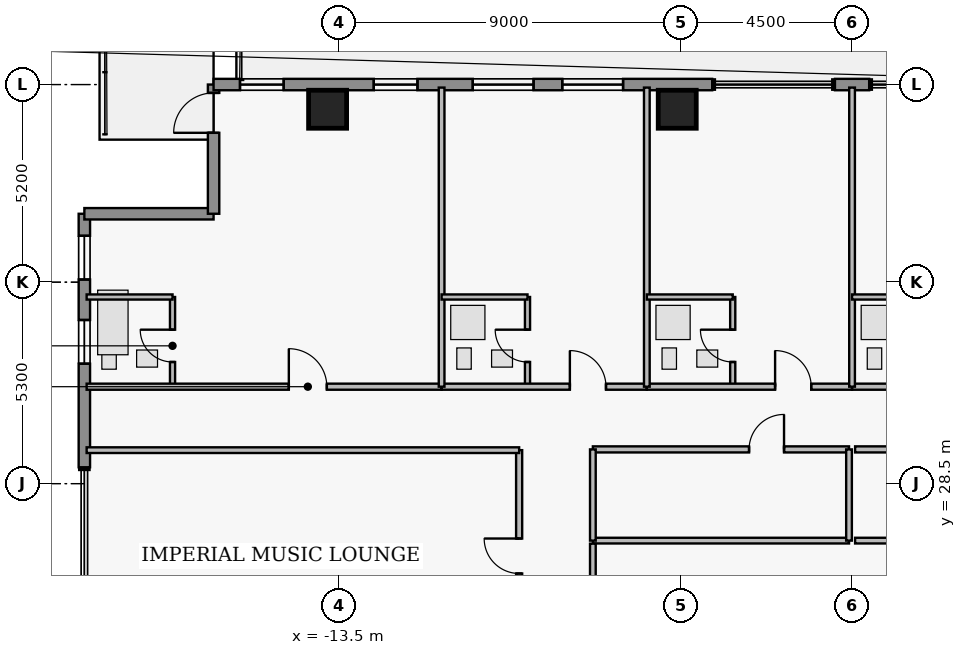
"""IFC4 building model, lengths in metres.
Left out: names, types, materials, properties, quantities, classifications, styles, units other than length and angle.
Written with IfcOpenShell. Run it as: python <this file> out.ifc"""

import sys

from ifc_helpers import new_model, si_unit, direction, frame, frame_2d, origin, origin_2d, place, context, subcontext, project, spatial, rectangle, extrude, element, fill, save


model = new_model("IFC4")
c1 = context("Model", 3, precision=1e-05, world=origin(), true_north=direction((0.0, 1.0)))
c2 = subcontext(c1, "Body", "Model", "MODEL_VIEW")
j1 = project(units=[si_unit("LENGTHUNIT", "METRE"), si_unit("PLANEANGLEUNIT", "RADIAN")], contexts=[c1])
p1 = place(None, origin())
s1 = spatial("IfcSite", under=j1, at=p1, CompositionType="ELEMENT")
p2 = place(p1, origin())
s2 = spatial("IfcBuilding", under=s1, at=p2, CompositionType="ELEMENT")
p3 = place(p2, frame((0.0, 0.0, 272.95)))
s3 = spatial("IfcBuildingStorey", under=s2, at=p3, CompositionType="ELEMENT", Elevation=272.95)
for number, where, z_axis, x_axis in (
    (1, (-13.8, 38.35, 0.0), (0.0, 0.0, 1.0), (1.0, 0.0, 0.0)),
    (2, (-4.6, 38.35, 0.0), (0.0, 0.0, 1.0), (1.0, 0.0, 0.0)),
):
    element("IfcColumn", number, at=place(p3, frame(where, z_axis=z_axis, x_axis=x_axis)), inside=s3, PredefinedType="COLUMN", context=c2, shape_type="SweptSolid", body=[
        extrude(rectangle(XDim=1.0, YDim=1.0, at=origin_2d()), origin(), (0.0, 0.0, 1.0), 3.7),
    ])
p4 = place(p3, frame((-20.2, 28.93, 0.0), z_axis=(0.0, 0.0, 1.0), x_axis=(0.0, 1.0, 0.0)))
e3 = element("IfcWall", 3, at=p4, inside=s3, PredefinedType="STANDARD", context=c2, shape_type="SweptSolid", body=[
    extrude(rectangle(XDim=6.67, YDim=0.3, at=frame_2d((3.335, 0.0))), origin(), (0.0, 0.0, 1.0), 3.48),
])
p5 = place(p4, frame((2.725, 0.0, 0.95)))
e4 = element("IfcOpeningElement", 4, at=p5, cuts=e3, PredefinedType="OPENING", context=c2, shape_type="SweptSolid", body=[
    extrude(rectangle(XDim=1.15, YDim=1.55, at=frame_2d((0.575, 0.775))), frame((0.0, 0.16, 0.0), z_axis=(0.0, -1.0, 0.0), x_axis=(1.0, 0.0, 0.0)), (0.0, 0.0, 1.0), 0.32),
])
p6 = place(p4, frame((4.94, 0.0, 0.95)))
e5 = element("IfcOpeningElement", 5, at=p6, cuts=e3, PredefinedType="OPENING", context=c2, shape_type="SweptSolid", body=[
    extrude(rectangle(XDim=1.15, YDim=1.55, at=frame_2d((0.575, 0.775))), frame((0.0, 0.16, 0.0), z_axis=(0.0, -1.0, 0.0), x_axis=(1.0, 0.0, 0.0)), (0.0, 0.0, 1.0), 0.32),
])
p7 = place(p3, frame((-20.2, 35.6, 0.0), z_axis=(0.0, 0.0, 1.0), x_axis=(1.0, 0.0, 0.0)))
e6 = element("IfcWall", 6, at=p7, inside=s3, PredefinedType="STANDARD", context=c2, shape_type="SweptSolid", body=[
    extrude(rectangle(XDim=3.4, YDim=0.3, at=frame_2d((1.7, 0.0))), origin(), (0.0, 0.0, 1.0), 3.48),
])
p8 = place(p3, frame((-16.8, 35.6, 0.0), z_axis=(0.0, 0.0, 1.0), x_axis=(0.0, 1.0, 0.0)))
e7 = element("IfcWall", 7, at=p8, inside=s3, PredefinedType="STANDARD", context=c2, shape_type="SweptSolid", body=[
    extrude(rectangle(XDim=3.4, YDim=0.3, at=frame_2d((1.7, 0.0))), origin(), (0.0, 0.0, 1.0), 3.48),
])
p9 = place(p8, frame((2.13, 0.0, 0.0)))
e8 = element("IfcOpeningElement", 8, at=p9, cuts=e7, PredefinedType="OPENING", context=c2, shape_type="SweptSolid", body=[
    extrude(rectangle(XDim=1.05, YDim=2.2, at=frame_2d((0.525, 1.1))), frame((0.0, 0.16, 0.0), z_axis=(0.0, -1.0, 0.0), x_axis=(1.0, 0.0, 0.0)), (0.0, 0.0, 1.0), 0.32),
])
p10 = place(p3, frame((-16.8, 39.0, 0.0), z_axis=(0.0, 0.0, 1.0), x_axis=(1.0, 0.0, 0.0)))
e9 = element("IfcWall", 9, at=p10, inside=s3, PredefinedType="STANDARD", context=c2, shape_type="SweptSolid", body=[
    extrude(rectangle(XDim=13.12, YDim=0.3, at=frame_2d((6.56, 0.0))), origin(), (0.0, 0.0, 1.0), 3.48),
])
p11 = place(p10, frame((6.82, 0.0, 0.85)))
e10 = element("IfcOpeningElement", 10, at=p11, cuts=e9, PredefinedType="OPENING", context=c2, shape_type="SweptSolid", body=[
    extrude(rectangle(XDim=1.6, YDim=1.8, at=frame_2d((0.8, 0.9))), frame((0.0, 0.16, 0.0), z_axis=(0.0, -1.0, 0.0), x_axis=(1.0, 0.0, 0.0)), (0.0, 0.0, 1.0), 0.32),
])
p12 = place(p10, frame((0.695, 0.0, 0.95)))
e11 = element("IfcOpeningElement", 11, at=p12, cuts=e9, PredefinedType="OPENING", context=c2, shape_type="SweptSolid", body=[
    extrude(rectangle(XDim=1.15, YDim=1.55, at=frame_2d((0.575, 0.775))), frame((0.0, 0.16, 0.0), z_axis=(0.0, -1.0, 0.0), x_axis=(1.0, 0.0, 0.0)), (0.0, 0.0, 1.0), 0.32),
])
p13 = place(p10, frame((4.215, 0.0, 0.95)))
e12 = element("IfcOpeningElement", 12, at=p13, cuts=e9, PredefinedType="OPENING", context=c2, shape_type="SweptSolid", body=[
    extrude(rectangle(XDim=1.15, YDim=1.55, at=frame_2d((0.575, 0.775))), frame((0.0, 0.16, 0.0), z_axis=(0.0, -1.0, 0.0), x_axis=(1.0, 0.0, 0.0)), (0.0, 0.0, 1.0), 0.32),
])
p14 = place(p10, frame((9.175, 0.0, 0.85)))
e13 = element("IfcOpeningElement", 13, at=p14, cuts=e9, PredefinedType="OPENING", context=c2, shape_type="SweptSolid", body=[
    extrude(rectangle(XDim=1.6, YDim=1.8, at=frame_2d((0.8, 0.9))), frame((0.0, 0.16, 0.0), z_axis=(0.0, -1.0, 0.0), x_axis=(1.0, 0.0, 0.0)), (0.0, 0.0, 1.0), 0.32),
])
p15 = place(p3, frame((-0.45, 39.0, 0.0), z_axis=(0.0, 0.0, 1.0), x_axis=(1.0, 0.0, 0.0)))
e14 = element("IfcWall", 14, at=p15, inside=s3, PredefinedType="STANDARD", context=c2, shape_type="SweptSolid", body=[
    extrude(rectangle(XDim=0.9, YDim=0.3, at=frame_2d((0.45, 0.0))), origin(), (0.0, 0.0, 1.0), 3.48),
])
p16 = place(p3, frame((-17.88, 31.05, 0.0), z_axis=(0.0, 0.0, 1.0), x_axis=(0.0, 1.0, 0.0)))
e15 = element("IfcWall", 15, at=p16, inside=s3, PredefinedType="PLUMBINGWALL", context=c2, shape_type="SweptSolid", body=[
    extrude(rectangle(XDim=2.36, YDim=0.135, at=frame_2d((1.18, 0.0))), origin(), (0.0, 0.0, 1.0), 3.48),
])
p17 = place(p16, frame((0.65, 0.0, 0.0)))
e16 = element("IfcOpeningElement", 16, at=p17, cuts=e15, PredefinedType="OPENING", context=c2, shape_type="SweptSolid", body=[
    extrude(rectangle(XDim=0.85, YDim=2.1, at=frame_2d((0.425, 1.05))), frame((0.0, 0.077, 0.0), z_axis=(0.0, -1.0, 0.0), x_axis=(1.0, 0.0, 0.0)), (0.0, 0.0, 1.0), 0.155),
])
p18 = place(p3, frame((-20.14, 31.05, 0.0), z_axis=(0.0, 0.0, 1.0), x_axis=(1.0, 0.0, 0.0)))
e17 = element("IfcWall", 17, at=p18, inside=s3, PredefinedType="PARTITIONING", context=c2, shape_type="SweptSolid", body=[
    extrude(rectangle(XDim=9.34, YDim=0.16, at=frame_2d((4.67, 0.0))), origin(), (0.0, 0.0, 1.0), 3.48),
])
p19 = place(p18, frame((5.32, 0.0, 0.0)))
e18 = element("IfcOpeningElement", 18, at=p19, cuts=e17, PredefinedType="OPENING", context=c2, shape_type="SweptSolid", body=[
    extrude(rectangle(XDim=1.0, YDim=2.15, at=frame_2d((0.5, 1.075))), frame((0.0, 0.09, 0.0), z_axis=(0.0, -1.0, 0.0), x_axis=(1.0, 0.0, 0.0)), (0.0, 0.0, 1.0), 0.18),
])
p20 = place(p3, frame((-8.54, 31.05, 0.0), z_axis=(0.0, 0.0, 1.0), x_axis=(0.0, 1.0, 0.0)))
e19 = element("IfcWall", 19, at=p20, inside=s3, PredefinedType="PLUMBINGWALL", context=c2, shape_type="SweptSolid", body=[
    extrude(rectangle(XDim=2.36, YDim=0.135, at=frame_2d((1.18, 0.0))), origin(), (0.0, 0.0, 1.0), 3.48),
])
p21 = place(p20, frame((0.65, 0.0, 0.0)))
e20 = element("IfcOpeningElement", 20, at=p21, cuts=e19, PredefinedType="OPENING", context=c2, shape_type="SweptSolid", body=[
    extrude(rectangle(XDim=0.85, YDim=2.1, at=frame_2d((0.425, 1.05))), frame((0.0, 0.077, 0.0), z_axis=(0.0, -1.0, 0.0), x_axis=(1.0, 0.0, 0.0)), (0.0, 0.0, 1.0), 0.155),
])
p22 = place(p3, frame((-10.8, 31.05, 0.0), z_axis=(0.0, 0.0, 1.0), x_axis=(1.0, 0.0, 0.0)))
e21 = element("IfcWall", 21, at=p22, inside=s3, PredefinedType="PARTITIONING", context=c2, shape_type="SweptSolid", body=[
    extrude(rectangle(XDim=5.4, YDim=0.16, at=frame_2d((2.7, 0.0))), origin(), (0.0, 0.0, 1.0), 3.48),
])
p23 = place(p22, frame((3.375, 0.0, 0.0)))
e22 = element("IfcOpeningElement", 22, at=p23, cuts=e21, PredefinedType="OPENING", context=c2, shape_type="SweptSolid", body=[
    extrude(rectangle(XDim=0.95, YDim=2.15, at=frame_2d((0.475, 1.075))), frame((0.0, 0.09, 0.0), z_axis=(0.0, -1.0, 0.0), x_axis=(1.0, 0.0, 0.0)), (0.0, 0.0, 1.0), 0.18),
])
p24 = place(p3, frame((-3.14, 31.05, 0.0), z_axis=(0.0, 0.0, 1.0), x_axis=(0.0, 1.0, 0.0)))
e23 = element("IfcWall", 23, at=p24, inside=s3, PredefinedType="PLUMBINGWALL", context=c2, shape_type="SweptSolid", body=[
    extrude(rectangle(XDim=2.36, YDim=0.135, at=frame_2d((1.18, 0.0))), origin(), (0.0, 0.0, 1.0), 3.48),
])
p25 = place(p24, frame((0.65, 0.0, 0.0)))
e24 = element("IfcOpeningElement", 24, at=p25, cuts=e23, PredefinedType="OPENING", context=c2, shape_type="SweptSolid", body=[
    extrude(rectangle(XDim=0.85, YDim=2.1, at=frame_2d((0.425, 1.05))), frame((0.0, 0.077, 0.0), z_axis=(0.0, -1.0, 0.0), x_axis=(1.0, 0.0, 0.0)), (0.0, 0.0, 1.0), 0.155),
])
p26 = place(p3, frame((-5.4, 31.05, 0.0), z_axis=(0.0, 0.0, 1.0), x_axis=(1.0, 0.0, 0.0)))
e25 = element("IfcWall", 25, at=p26, inside=s3, PredefinedType="PARTITIONING", context=c2, shape_type="SweptSolid", body=[
    extrude(rectangle(XDim=5.4, YDim=0.16, at=frame_2d((2.7, 0.0))), origin(), (0.0, 0.0, 1.0), 3.48),
])
p27 = place(p26, frame((3.375, 0.0, 0.0)))
e26 = element("IfcOpeningElement", 26, at=p27, cuts=e25, PredefinedType="OPENING", context=c2, shape_type="SweptSolid", body=[
    extrude(rectangle(XDim=0.95, YDim=2.15, at=frame_2d((0.475, 1.075))), frame((0.0, 0.09, 0.0), z_axis=(0.0, -1.0, 0.0), x_axis=(1.0, 0.0, 0.0)), (0.0, 0.0, 1.0), 0.18),
])
p28 = place(p3, frame((0.0, 31.05, 0.0), z_axis=(0.0, 0.0, 1.0), x_axis=(1.0, 0.0, 0.0)))
e27 = element("IfcWall", 27, at=p28, inside=s3, PredefinedType="PARTITIONING", context=c2, shape_type="SweptSolid", body=[
    extrude(rectangle(XDim=5.4, YDim=0.16, at=frame_2d((2.7, 0.0))), origin(), (0.0, 0.0, 1.0), 3.48),
])
p29 = place(p28, frame((3.375, 0.0, 0.0)))
e28 = element("IfcOpeningElement", 28, at=p29, cuts=e27, PredefinedType="OPENING", context=c2, shape_type="SweptSolid", body=[
    extrude(rectangle(XDim=0.95, YDim=2.15, at=frame_2d((0.475, 1.075))), frame((0.0, 0.09, 0.0), z_axis=(0.0, -1.0, 0.0), x_axis=(1.0, 0.0, 0.0)), (0.0, 0.0, 1.0), 0.18),
])
p30 = place(p3, frame((-6.82, 29.4, 0.0), z_axis=(0.0, 0.0, 1.0), x_axis=(1.0, 0.0, 0.0)))
e29 = element("IfcWall", 29, at=p30, inside=s3, PredefinedType="PARTITIONING", context=c2, shape_type="SweptSolid", body=[
    extrude(rectangle(XDim=6.74, YDim=0.16, at=frame_2d((3.37, 0.0))), origin(), (0.0, 0.0, 1.0), 3.48),
])
p31 = place(p30, frame((4.11, 0.0, 0.0)))
e30 = element("IfcOpeningElement", 30, at=p31, cuts=e29, PredefinedType="OPENING", context=c2, shape_type="SweptSolid", body=[
    extrude(rectangle(XDim=0.92, YDim=2.12, at=frame_2d((0.46, 1.06))), frame((0.0, 0.09, 0.0), z_axis=(0.0, -1.0, 0.0), x_axis=(1.0, 0.0, 0.0)), (0.0, 0.0, 1.0), 0.18),
])
p32 = place(p3, frame((0.08, 29.4, 0.0), z_axis=(0.0, 0.0, 1.0), x_axis=(1.0, 0.0, 0.0)))
e31 = element("IfcWall", 31, at=p32, inside=s3, PredefinedType="PARTITIONING", context=c2, shape_type="SweptSolid", body=[
    extrude(rectangle(XDim=6.74, YDim=0.16, at=frame_2d((3.37, 0.0))), origin(), (0.0, 0.0, 1.0), 3.48),
])
p33 = place(p32, frame((1.71, 0.0, 0.0)))
e32 = element("IfcOpeningElement", 32, at=p33, cuts=e31, PredefinedType="OPENING", context=c2, shape_type="SweptSolid", body=[
    extrude(rectangle(XDim=0.92, YDim=2.12, at=frame_2d((0.46, 1.06))), frame((0.0, 0.09, 0.0), z_axis=(0.0, -1.0, 0.0), x_axis=(1.0, 0.0, 0.0)), (0.0, 0.0, 1.0), 0.18),
])
p34 = place(p3, frame((-8.76, 23.81, 0.0), z_axis=(0.0, 0.0, 1.0), x_axis=(0.0, 1.0, 0.0)))
e33 = element("IfcWall", 33, at=p34, inside=s3, PredefinedType="PARTITIONING", context=c2, shape_type="SweptSolid", body=[
    extrude(rectangle(XDim=5.57, YDim=0.16, at=frame_2d((2.785, 0.0))), origin(), (0.0, 0.0, 1.0), 3.48),
])
p35 = place(p34, frame((2.325, 0.0, 0.0)))
e34 = element("IfcOpeningElement", 34, at=p35, cuts=e33, PredefinedType="OPENING", context=c2, shape_type="SweptSolid", body=[
    extrude(rectangle(XDim=0.92, YDim=2.12, at=frame_2d((0.46, 1.06))), frame((0.0, 0.09, 0.0), z_axis=(0.0, -1.0, 0.0), x_axis=(1.0, 0.0, 0.0)), (0.0, 0.0, 1.0), 0.18),
])
p36 = place(p3, frame((-20.14, 33.41, 0.0), z_axis=(0.0, 0.0, 1.0), x_axis=(1.0, 0.0, 0.0)))
e35 = element("IfcWall", 35, at=p36, inside=s3, PredefinedType="PLUMBINGWALL", context=c2, shape_type="SweptSolid", body=[
    extrude(rectangle(XDim=2.26, YDim=0.135, at=frame_2d((1.13, 0.0))), origin(), (0.0, 0.0, 1.0), 3.48),
])
p37 = place(p3, frame((-10.8, 31.05, 0.0), z_axis=(0.0, 0.0, 1.0), x_axis=(0.0, 1.0, 0.0)))
e36 = element("IfcWall", 36, at=p37, inside=s3, PredefinedType="PARTITIONING", context=c2, shape_type="SweptSolid", body=[
    extrude(rectangle(XDim=7.87, YDim=0.15, at=frame_2d((3.935, 0.0))), origin(), (0.0, 0.0, 1.0), 3.48),
])
p38 = place(p3, frame((-10.8, 33.41, 0.0), z_axis=(0.0, 0.0, 1.0), x_axis=(1.0, 0.0, 0.0)))
e37 = element("IfcWall", 37, at=p38, inside=s3, PredefinedType="PLUMBINGWALL", context=c2, shape_type="SweptSolid", body=[
    extrude(rectangle(XDim=2.26, YDim=0.135, at=frame_2d((1.13, 0.0))), origin(), (0.0, 0.0, 1.0), 3.076),
])
p39 = place(p3, frame((-5.4, 31.05, 0.0), z_axis=(0.0, 0.0, 1.0), x_axis=(0.0, 1.0, 0.0)))
e38 = element("IfcWall", 38, at=p39, inside=s3, PredefinedType="PARTITIONING", context=c2, shape_type="SweptSolid", body=[
    extrude(rectangle(XDim=7.87, YDim=0.15, at=frame_2d((3.935, 0.0))), origin(), (0.0, 0.0, 1.0), 3.48),
])
p40 = place(p3, frame((-5.4, 33.41, 0.0), z_axis=(0.0, 0.0, 1.0), x_axis=(1.0, 0.0, 0.0)))
e39 = element("IfcWall", 39, at=p40, inside=s3, PredefinedType="PLUMBINGWALL", context=c2, shape_type="SweptSolid", body=[
    extrude(rectangle(XDim=2.26, YDim=0.135, at=frame_2d((1.13, 0.0))), origin(), (0.0, 0.0, 1.0), 3.076),
])
p41 = place(p3, frame((0.0, 31.05, 0.0), z_axis=(0.0, 0.0, 1.0), x_axis=(0.0, 1.0, 0.0)))
e40 = element("IfcWall", 40, at=p41, inside=s3, PredefinedType="PARTITIONING", context=c2, shape_type="SweptSolid", body=[
    extrude(rectangle(XDim=7.87, YDim=0.15, at=frame_2d((3.935, 0.0))), origin(), (0.0, 0.0, 1.0), 3.48),
])
p42 = place(p3, frame((0.0, 33.41, 0.0), z_axis=(0.0, 0.0, 1.0), x_axis=(1.0, 0.0, 0.0)))
e41 = element("IfcWall", 41, at=p42, inside=s3, PredefinedType="PLUMBINGWALL", context=c2, shape_type="SweptSolid", body=[
    extrude(rectangle(XDim=2.26, YDim=0.135, at=frame_2d((1.13, 0.0))), origin(), (0.0, 0.0, 1.0), 3.076),
])
p43 = place(p3, frame((-6.82, 27.0, 0.0), z_axis=(0.0, 0.0, 1.0), x_axis=(1.0, 0.0, 0.0)))
e42 = element("IfcWall", 42, at=p43, inside=s3, PredefinedType="PARTITIONING", context=c2, shape_type="SweptSolid", body=[
    extrude(rectangle(XDim=6.74, YDim=0.15, at=frame_2d((3.37, 0.0))), origin(), (0.0, 0.0, 1.0), 3.48),
])
for number, where, z_axis, x_axis in (
    (43, (-6.82, 27.0, 0.0), (0.0, 0.0, 1.0), (0.0, 1.0, 0.0)),
    (44, (-0.08, 27.0, 0.0), (0.0, 0.0, 1.0), (0.0, 1.0, 0.0)),
):
    element("IfcWall", number, at=place(p3, frame(where, z_axis=z_axis, x_axis=x_axis)), inside=s3, PredefinedType="PARTITIONING", context=c2, shape_type="SweptSolid", body=[
        extrude(rectangle(XDim=2.4, YDim=0.15, at=frame_2d((1.2, 0.0))), origin(), (0.0, 0.0, 1.0), 3.48),
    ])
p44 = place(p3, frame((0.08, 27.0, 0.0), z_axis=(0.0, 0.0, 1.0), x_axis=(1.0, 0.0, 0.0)))
e45 = element("IfcWall", 45, at=p44, inside=s3, PredefinedType="PARTITIONING", context=c2, shape_type="SweptSolid", body=[
    extrude(rectangle(XDim=6.74, YDim=0.15, at=frame_2d((3.37, 0.0))), origin(), (0.0, 0.0, 1.0), 3.48),
])
p45 = place(p3, frame((-6.82, 16.7, 0.0), z_axis=(0.0, 0.0, 1.0), x_axis=(0.0, 1.0, 0.0)))
e46 = element("IfcWall", 46, at=p45, inside=s3, PredefinedType="PARTITIONING", context=c2, shape_type="SweptSolid", body=[
    extrude(rectangle(XDim=10.22, YDim=0.15, at=frame_2d((5.11, 0.0))), origin(), (0.0, 0.0, 1.0), 3.48),
])
p46 = place(p3, frame((-20.14, 29.38, 0.0), z_axis=(0.0, 0.0, 1.0), x_axis=(1.0, 0.0, 0.0)))
e47 = element("IfcWall", 47, at=p46, inside=s3, PredefinedType="PARTITIONING", context=c2, shape_type="SweptSolid", body=[
    extrude(rectangle(XDim=11.38, YDim=0.15, at=frame_2d((5.69, 0.0))), origin(), (0.0, 0.0, 1.0), 3.48),
])
p47 = place(p5, origin())
e48 = element("IfcWindow", 48, at=p47, inside=s3, PartitioningType="SINGLE_PANEL", PredefinedType="WINDOW", context=c2, shape_type="SweptSolid", body=[
    extrude(rectangle(XDim=1.15, YDim=1.55, at=frame_2d((0.575, 0.775))), frame((0.0, 0.03, 0.0), z_axis=(0.0, -1.0, 0.0), x_axis=(1.0, 0.0, 0.0)), (0.0, 0.0, 1.0), 0.06),
])
fill(e4, e48)
p48 = place(p6, origin())
e49 = element("IfcWindow", 49, at=p48, inside=s3, PartitioningType="SINGLE_PANEL", PredefinedType="WINDOW", context=c2, shape_type="SweptSolid", body=[
    extrude(rectangle(XDim=1.15, YDim=1.55, at=frame_2d((0.575, 0.775))), frame((0.0, 0.03, 0.0), z_axis=(0.0, -1.0, 0.0), x_axis=(1.0, 0.0, 0.0)), (0.0, 0.0, 1.0), 0.06),
])
fill(e5, e49)
p49 = place(p9, origin())
e50 = element("IfcDoor", 50, at=p49, inside=s3, OperationType="SINGLE_SWING_LEFT", PredefinedType="DOOR", context=c2, shape_type="SweptSolid", body=[
    extrude(rectangle(XDim=1.05, YDim=2.2, at=frame_2d((0.525, 1.1))), frame((0.0, 0.025, 0.0), z_axis=(0.0, -1.0, 0.0), x_axis=(1.0, 0.0, 0.0)), (0.0, 0.0, 1.0), 0.05),
])
fill(e8, e50)
p50 = place(p11, origin())
e51 = element("IfcWindow", 51, at=p50, inside=s3, PartitioningType="SINGLE_PANEL", PredefinedType="WINDOW", context=c2, shape_type="SweptSolid", body=[
    extrude(rectangle(XDim=1.6, YDim=1.8, at=frame_2d((0.8, 0.9))), frame((0.0, 0.03, 0.0), z_axis=(0.0, -1.0, 0.0), x_axis=(1.0, 0.0, 0.0)), (0.0, 0.0, 1.0), 0.06),
])
fill(e10, e51)
p51 = place(p12, origin())
e52 = element("IfcWindow", 52, at=p51, inside=s3, PartitioningType="SINGLE_PANEL", PredefinedType="WINDOW", context=c2, shape_type="SweptSolid", body=[
    extrude(rectangle(XDim=1.15, YDim=1.55, at=frame_2d((0.575, 0.775))), frame((0.0, 0.03, 0.0), z_axis=(0.0, -1.0, 0.0), x_axis=(1.0, 0.0, 0.0)), (0.0, 0.0, 1.0), 0.06),
])
fill(e11, e52)
p52 = place(p13, origin())
e53 = element("IfcWindow", 53, at=p52, inside=s3, PartitioningType="SINGLE_PANEL", PredefinedType="WINDOW", context=c2, shape_type="SweptSolid", body=[
    extrude(rectangle(XDim=1.15, YDim=1.55, at=frame_2d((0.575, 0.775))), frame((0.0, 0.03, 0.0), z_axis=(0.0, -1.0, 0.0), x_axis=(1.0, 0.0, 0.0)), (0.0, 0.0, 1.0), 0.06),
])
fill(e12, e53)
p53 = place(p14, origin())
e54 = element("IfcWindow", 54, at=p53, inside=s3, PartitioningType="SINGLE_PANEL", PredefinedType="WINDOW", context=c2, shape_type="SweptSolid", body=[
    extrude(rectangle(XDim=1.6, YDim=1.8, at=frame_2d((0.8, 0.9))), frame((0.0, 0.03, 0.0), z_axis=(0.0, -1.0, 0.0), x_axis=(1.0, 0.0, 0.0)), (0.0, 0.0, 1.0), 0.06),
])
fill(e13, e54)
p54 = place(p17, origin())
e55 = element("IfcDoor", 55, at=p54, inside=s3, OperationType="SINGLE_SWING_RIGHT", PredefinedType="DOOR", context=c2, shape_type="SweptSolid", body=[
    extrude(rectangle(XDim=0.85, YDim=2.1, at=frame_2d((0.425, 1.05))), frame((0.0, 0.025, 0.0), z_axis=(0.0, -1.0, 0.0), x_axis=(1.0, 0.0, 0.0)), (0.0, 0.0, 1.0), 0.05),
])
fill(e16, e55)
p55 = place(p19, origin())
e56 = element("IfcDoor", 56, at=p55, inside=s3, OperationType="SINGLE_SWING_LEFT", PredefinedType="DOOR", context=c2, shape_type="SweptSolid", body=[
    extrude(rectangle(XDim=1.0, YDim=2.15, at=frame_2d((0.5, 1.075))), frame((0.0, 0.025, 0.0), z_axis=(0.0, -1.0, 0.0), x_axis=(1.0, 0.0, 0.0)), (0.0, 0.0, 1.0), 0.05),
])
fill(e18, e56)
p56 = place(p21, origin())
e57 = element("IfcDoor", 57, at=p56, inside=s3, OperationType="SINGLE_SWING_RIGHT", PredefinedType="DOOR", context=c2, shape_type="SweptSolid", body=[
    extrude(rectangle(XDim=0.85, YDim=2.1, at=frame_2d((0.425, 1.05))), frame((0.0, 0.025, 0.0), z_axis=(0.0, -1.0, 0.0), x_axis=(1.0, 0.0, 0.0)), (0.0, 0.0, 1.0), 0.05),
])
fill(e20, e57)
p57 = place(p23, origin())
e58 = element("IfcDoor", 58, at=p57, inside=s3, OperationType="SINGLE_SWING_LEFT", PredefinedType="DOOR", context=c2, shape_type="SweptSolid", body=[
    extrude(rectangle(XDim=0.95, YDim=2.15, at=frame_2d((0.475, 1.075))), frame((0.0, 0.025, 0.0), z_axis=(0.0, -1.0, 0.0), x_axis=(1.0, 0.0, 0.0)), (0.0, 0.0, 1.0), 0.05),
])
fill(e22, e58)
p58 = place(p25, origin())
e59 = element("IfcDoor", 59, at=p58, inside=s3, OperationType="SINGLE_SWING_RIGHT", PredefinedType="DOOR", context=c2, shape_type="SweptSolid", body=[
    extrude(rectangle(XDim=0.85, YDim=2.1, at=frame_2d((0.425, 1.05))), frame((0.0, 0.025, 0.0), z_axis=(0.0, -1.0, 0.0), x_axis=(1.0, 0.0, 0.0)), (0.0, 0.0, 1.0), 0.05),
])
fill(e24, e59)
p59 = place(p27, origin())
e60 = element("IfcDoor", 60, at=p59, inside=s3, OperationType="SINGLE_SWING_LEFT", PredefinedType="DOOR", context=c2, shape_type="SweptSolid", body=[
    extrude(rectangle(XDim=0.95, YDim=2.15, at=frame_2d((0.475, 1.075))), frame((0.0, 0.025, 0.0), z_axis=(0.0, -1.0, 0.0), x_axis=(1.0, 0.0, 0.0)), (0.0, 0.0, 1.0), 0.05),
])
fill(e26, e60)
p60 = place(p31, origin())
e61 = element("IfcDoor", 61, at=p60, inside=s3, OperationType="SINGLE_SWING_RIGHT", PredefinedType="DOOR", context=c2, shape_type="SweptSolid", body=[
    extrude(rectangle(XDim=0.92, YDim=2.12, at=frame_2d((0.46, 1.06))), frame((0.0, 0.025, 0.0), z_axis=(0.0, -1.0, 0.0), x_axis=(1.0, 0.0, 0.0)), (0.0, 0.0, 1.0), 0.05),
])
fill(e30, e61)
p61 = place(p35, origin())
e62 = element("IfcDoor", 62, at=p61, inside=s3, OperationType="SINGLE_SWING_RIGHT", PredefinedType="DOOR", context=c2, shape_type="SweptSolid", body=[
    extrude(rectangle(XDim=0.92, YDim=2.12, at=frame_2d((0.46, 1.06))), frame((0.0, 0.025, 0.0), z_axis=(0.0, -1.0, 0.0), x_axis=(1.0, 0.0, 0.0)), (0.0, 0.0, 1.0), 0.05),
])
fill(e34, e62)
save(model, sys.argv[1])
